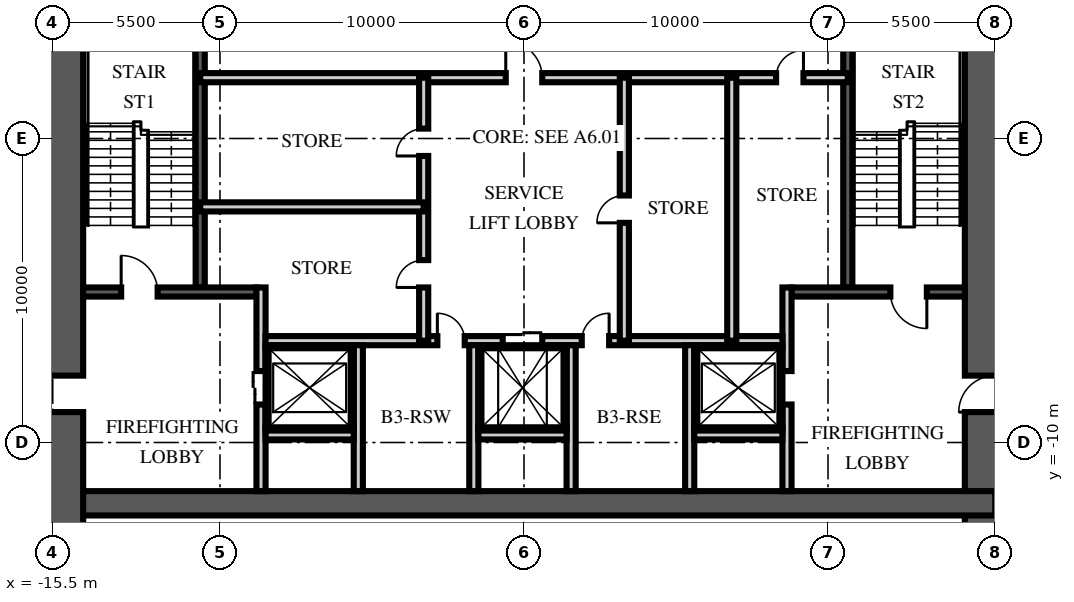
"""IFC4 building model, lengths in metres.
Left out: names, types, materials, properties, quantities, classifications, styles, units other than length and angle.
Written with IfcOpenShell. Run it as: python <this file> out.ifc"""

import sys

from ifc_helpers import new_model, si_unit, direction, frame, frame_2d, origin, place, context, subcontext, project, spatial, rectangle, extrude, element, fill, save


model = new_model("IFC4")
c1 = context("Model", 3, precision=1e-05, world=origin(), true_north=direction((0.0, 1.0)))
c2 = subcontext(c1, "Body", "Model", "MODEL_VIEW")
j1 = project(units=[si_unit("LENGTHUNIT", "METRE"), si_unit("PLANEANGLEUNIT", "RADIAN")], contexts=[c1])
p1 = place(None, origin())
s1 = spatial("IfcSite", under=j1, at=p1, CompositionType="ELEMENT")
p2 = place(p1, origin())
s2 = spatial("IfcBuilding", under=s1, at=p2, CompositionType="ELEMENT")
p3 = place(p2, frame((0.0, 0.0, -13.2)))
s3 = spatial("IfcBuildingStorey", under=s2, at=p3, CompositionType="ELEMENT", Elevation=-13.2)
p4 = place(p3, frame((15.5, -15.5, -0.4), z_axis=(0.0, 0.0, 1.0), x_axis=(0.0, 1.0, 0.0)))
e1 = element("IfcWall", 1, at=p4, inside=s3, PredefinedType="SHEAR", context=c2, shape_type="SweptSolid", body=[
    extrude(rectangle(XDim=31.0, YDim=2.0, at=frame_2d((15.5, 0.0))), origin(), (0.0, 0.0, 1.0), 4.3),
])
p5 = place(p4, frame((6.5, 0.0, 0.4)))
e2 = element("IfcOpeningElement", 2, at=p5, cuts=e1, PredefinedType="OPENING", context=c2, shape_type="SweptSolid", body=[
    extrude(rectangle(XDim=1.2, YDim=2.1, at=frame_2d((0.6, 1.05))), frame((0.0, 1.01, 0.0), z_axis=(0.0, -1.0, 0.0), x_axis=(1.0, 0.0, 0.0)), (0.0, 0.0, 1.0), 2.02),
])
p6 = place(p4, frame((23.0, 0.0, 0.4)))
e3 = element("IfcOpeningElement", 3, at=p6, cuts=e1, PredefinedType="OPENING", context=c2, shape_type="SweptSolid", body=[
    extrude(rectangle(XDim=1.8, YDim=2.1, at=frame_2d((0.9, 1.05))), frame((0.0, 1.01, 0.0), z_axis=(0.0, -1.0, 0.0), x_axis=(1.0, 0.0, 0.0)), (0.0, 0.0, 1.0), 2.02),
])
p7 = place(p3, frame((-15.5, -12.0, -0.4), z_axis=(0.0, 0.0, 1.0), x_axis=(1.0, 0.0, 0.0)))
e4 = element("IfcWall", 4, at=p7, inside=s3, PredefinedType="SHEAR", context=c2, shape_type="SweptSolid", body=[
    extrude(rectangle(XDim=31.0, YDim=0.8, at=frame_2d((15.5, 0.0))), origin(), (0.0, 0.0, 1.0), 4.3),
])
p8 = place(p3, frame((-15.5, -15.5, -0.4), z_axis=(0.0, 0.0, 1.0), x_axis=(0.0, 1.0, 0.0)))
e5 = element("IfcWall", 5, at=p8, inside=s3, PredefinedType="SHEAR", context=c2, shape_type="SweptSolid", body=[
    extrude(rectangle(XDim=31.0, YDim=2.0, at=frame_2d((15.5, 0.0))), origin(), (0.0, 0.0, 1.0), 4.3),
])
p9 = place(p8, frame((6.5, 0.0, 0.4)))
e6 = element("IfcOpeningElement", 6, at=p9, cuts=e5, PredefinedType="OPENING", context=c2, shape_type="SweptSolid", body=[
    extrude(rectangle(XDim=1.2, YDim=2.1, at=frame_2d((0.6, 1.05))), frame((0.0, 1.01, 0.0), z_axis=(0.0, -1.0, 0.0), x_axis=(1.0, 0.0, 0.0)), (0.0, 0.0, 1.0), 2.02),
])
p10 = place(p8, frame((23.0, 0.0, 0.4)))
e7 = element("IfcOpeningElement", 7, at=p10, cuts=e5, PredefinedType="OPENING", context=c2, shape_type="SweptSolid", body=[
    extrude(rectangle(XDim=1.8, YDim=2.1, at=frame_2d((0.9, 1.05))), frame((0.0, 1.01, 0.0), z_axis=(0.0, -1.0, 0.0), x_axis=(1.0, 0.0, 0.0)), (0.0, 0.0, 1.0), 2.02),
])
p11 = place(p3, frame((-10.65, -4.9, 0.0), z_axis=(0.0, 0.0, 1.0), x_axis=(0.0, 1.0, 0.0)))
e8 = element("IfcWall", 8, at=p11, inside=s3, PredefinedType="SOLIDWALL", context=c2, shape_type="SweptSolid", body=[
    extrude(rectangle(XDim=10.1, YDim=0.3, at=frame_2d((5.05, 0.0))), origin(), (0.0, 0.0, 1.0), 3.9),
])
p12 = place(p3, frame((-14.5, -5.05, 0.0), z_axis=(0.0, 0.0, 1.0), x_axis=(1.0, 0.0, 0.0)))
e9 = element("IfcWall", 9, at=p12, inside=s3, PredefinedType="SOLIDWALL", context=c2, shape_type="SweptSolid", body=[
    extrude(rectangle(XDim=5.7, YDim=0.3, at=frame_2d((2.85, 0.0))), origin(), (0.0, 0.0, 1.0), 3.9),
])
p13 = place(p12, frame((1.25, 0.0, 0.0)))
e10 = element("IfcOpeningElement", 10, at=p13, cuts=e9, PredefinedType="OPENING", context=c2, shape_type="SweptSolid", body=[
    extrude(rectangle(XDim=1.2, YDim=2.1, at=frame_2d((0.6, 1.05))), frame((0.0, 0.16, 0.0), z_axis=(0.0, -1.0, 0.0), x_axis=(1.0, 0.0, 0.0)), (0.0, 0.0, 1.0), 0.32),
])
p14 = place(p3, frame((-8.65, -11.6, 0.0), z_axis=(0.0, 0.0, 1.0), x_axis=(0.0, 1.0, 0.0)))
e11 = element("IfcWall", 11, at=p14, inside=s3, PredefinedType="PARTITIONING", context=c2, shape_type="SweptSolid", body=[
    extrude(rectangle(XDim=6.7, YDim=0.3, at=frame_2d((3.35, 0.0))), origin(), (0.0, 0.0, 1.0), 3.9),
])
p15 = place(p14, frame((2.85, 0.0, 0.0)))
e12 = element("IfcOpeningElement", 12, at=p15, cuts=e11, PredefinedType="OPENING", context=c2, shape_type="SweptSolid", body=[
    extrude(rectangle(XDim=1.1, YDim=2.1, at=frame_2d((0.55, 1.05))), frame((0.0, 0.16, 0.0), z_axis=(0.0, -1.0, 0.0), x_axis=(1.0, 0.0, 0.0)), (0.0, 0.0, 1.0), 0.32),
])
p16 = place(p3, frame((10.65, -4.9, 0.0), z_axis=(0.0, 0.0, 1.0), x_axis=(0.0, 1.0, 0.0)))
e13 = element("IfcWall", 13, at=p16, inside=s3, PredefinedType="SOLIDWALL", context=c2, shape_type="SweptSolid", body=[
    extrude(rectangle(XDim=10.1, YDim=0.3, at=frame_2d((5.05, 0.0))), origin(), (0.0, 0.0, 1.0), 3.9),
])
p17 = place(p3, frame((14.5, -5.05, 0.0), z_axis=(0.0, 0.0, 1.0), x_axis=(-1.0, 0.0, 0.0)))
e14 = element("IfcWall", 14, at=p17, inside=s3, PredefinedType="SOLIDWALL", context=c2, shape_type="SweptSolid", body=[
    extrude(rectangle(XDim=5.7, YDim=0.3, at=frame_2d((2.85, 0.0))), origin(), (0.0, 0.0, 1.0), 3.9),
])
p18 = place(p17, frame((1.25, 0.0, 0.0)))
e15 = element("IfcOpeningElement", 15, at=p18, cuts=e14, PredefinedType="OPENING", context=c2, shape_type="SweptSolid", body=[
    extrude(rectangle(XDim=1.2, YDim=2.1, at=frame_2d((0.6, 1.05))), frame((0.0, 0.16, 0.0), z_axis=(0.0, -1.0, 0.0), x_axis=(1.0, 0.0, 0.0)), (0.0, 0.0, 1.0), 0.32),
])
p19 = place(p3, frame((8.65, -11.6, 0.0), z_axis=(0.0, 0.0, 1.0), x_axis=(0.0, 1.0, 0.0)))
e16 = element("IfcWall", 16, at=p19, inside=s3, PredefinedType="PARTITIONING", context=c2, shape_type="SweptSolid", body=[
    extrude(rectangle(XDim=6.7, YDim=0.3, at=frame_2d((3.35, 0.0))), origin(), (0.0, 0.0, 1.0), 3.9),
])
p20 = place(p19, frame((2.85, 0.0, 0.0)))
e17 = element("IfcOpeningElement", 17, at=p20, cuts=e16, PredefinedType="OPENING", context=c2, shape_type="SweptSolid", body=[
    extrude(rectangle(XDim=1.1, YDim=2.1, at=frame_2d((0.55, 1.05))), frame((0.0, 0.16, 0.0), z_axis=(0.0, -1.0, 0.0), x_axis=(1.0, 0.0, 0.0)), (0.0, 0.0, 1.0), 0.32),
])
p21 = place(p3, frame((-8.5, -6.65, 0.0), z_axis=(0.0, 0.0, 1.0), x_axis=(1.0, 0.0, 0.0)))
e18 = element("IfcWall", 18, at=p21, inside=s3, PredefinedType="PARTITIONING", context=c2, shape_type="SweptSolid", body=[
    extrude(rectangle(XDim=17.0, YDim=0.3, at=frame_2d((8.5, 0.0))), origin(), (0.0, 0.0, 1.0), 3.9),
])
p22 = place(p21, frame((7.8, 0.0, 0.0)))
e19 = element("IfcOpeningElement", 19, at=p22, cuts=e18, PredefinedType="OPENING", context=c2, shape_type="SweptSolid", body=[
    extrude(rectangle(XDim=1.3, YDim=2.4, at=frame_2d((0.65, 1.2))), frame((0.0, 0.16, 0.0), z_axis=(0.0, -1.0, 0.0), x_axis=(1.0, 0.0, 0.0)), (0.0, 0.0, 1.0), 0.32),
])
p23 = place(p21, frame((5.65, 0.0, 0.0)))
e20 = element("IfcOpeningElement", 20, at=p23, cuts=e18, PredefinedType="OPENING", context=c2, shape_type="SweptSolid", body=[
    extrude(rectangle(XDim=0.9, YDim=2.1, at=frame_2d((0.45, 1.05))), frame((0.0, 0.16, 0.0), z_axis=(0.0, -1.0, 0.0), x_axis=(1.0, 0.0, 0.0)), (0.0, 0.0, 1.0), 0.32),
])
p24 = place(p21, frame((10.4, 0.0, 0.0)))
e21 = element("IfcOpeningElement", 21, at=p24, cuts=e18, PredefinedType="OPENING", context=c2, shape_type="SweptSolid", body=[
    extrude(rectangle(XDim=0.9, YDim=2.1, at=frame_2d((0.45, 1.05))), frame((0.0, 0.16, 0.0), z_axis=(0.0, -1.0, 0.0), x_axis=(1.0, 0.0, 0.0)), (0.0, 0.0, 1.0), 0.32),
])
for number, where, z_axis, x_axis in (
    (22, (-5.45, -11.6, 0.0), (0.0, 0.0, 1.0), (0.0, 1.0, 0.0)),
    (23, (-1.65, -11.6, 0.0), (0.0, 0.0, 1.0), (0.0, 1.0, 0.0)),
    (24, (1.55, -11.6, 0.0), (0.0, 0.0, 1.0), (0.0, 1.0, 0.0)),
    (25, (5.45, -11.6, 0.0), (0.0, 0.0, 1.0), (0.0, 1.0, 0.0)),
):
    element("IfcWall", number, at=place(p3, frame(where, z_axis=z_axis, x_axis=x_axis)), inside=s3, PredefinedType="PARTITIONING", context=c2, shape_type="SweptSolid", body=[
        extrude(rectangle(XDim=4.8, YDim=0.3, at=frame_2d((2.4, 0.0))), origin(), (0.0, 0.0, 1.0), 3.9),
    ])
for number, where, z_axis, x_axis in (
    (26, (-8.5, -9.75, 0.0), (0.0, 0.0, 1.0), (1.0, 0.0, 0.0)),
    (27, (-1.5, -9.75, 0.0), (0.0, 0.0, 1.0), (1.0, 0.0, 0.0)),
    (28, (5.6, -9.75, 0.0), (0.0, 0.0, 1.0), (1.0, 0.0, 0.0)),
):
    element("IfcWall", number, at=place(p3, frame(where, z_axis=z_axis, x_axis=x_axis)), inside=s3, PredefinedType="PARTITIONING", context=c2, shape_type="SweptSolid", body=[
        extrude(rectangle(XDim=2.9, YDim=0.3, at=frame_2d((1.45, 0.0))), origin(), (0.0, 0.0, 1.0), 3.9),
    ])
p25 = place(p3, frame((-10.65, 2.0, 0.0), z_axis=(0.0, 0.0, 1.0), x_axis=(1.0, 0.0, 0.0)))
e29 = element("IfcWall", 29, at=p25, inside=s3, PredefinedType="PARTITIONING", context=c2, shape_type="SweptSolid", body=[
    extrude(rectangle(XDim=21.3, YDim=0.3, at=frame_2d((10.65, 0.0))), origin(), (0.0, 0.0, 1.0), 3.9),
])
p26 = place(p25, frame((10.05, 0.0, 0.0)))
e30 = element("IfcOpeningElement", 30, at=p26, cuts=e29, PredefinedType="OPENING", context=c2, shape_type="SweptSolid", body=[
    extrude(rectangle(XDim=1.2, YDim=2.1, at=frame_2d((0.6, 1.05))), frame((0.0, 0.16, 0.0), z_axis=(0.0, -1.0, 0.0), x_axis=(1.0, 0.0, 0.0)), (0.0, 0.0, 1.0), 0.32),
])
p27 = place(p25, frame((18.942, 0.0, 0.0)))
e31 = element("IfcOpeningElement", 31, at=p27, cuts=e29, PredefinedType="OPENING", context=c2, shape_type="SweptSolid", body=[
    extrude(rectangle(XDim=0.9, YDim=2.1, at=frame_2d((0.45, 1.05))), frame((0.0, 0.16, 0.0), z_axis=(0.0, -1.0, 0.0), x_axis=(1.0, 0.0, 0.0)), (0.0, 0.0, 1.0), 0.32),
])
p28 = place(p3, frame((-3.3, -6.65, 0.0), z_axis=(0.0, 0.0, 1.0), x_axis=(0.0, 1.0, 0.0)))
e32 = element("IfcWall", 32, at=p28, inside=s3, PredefinedType="PARTITIONING", context=c2, shape_type="SweptSolid", body=[
    extrude(rectangle(XDim=8.65, YDim=0.3, at=frame_2d((4.325, 0.0))), origin(), (0.0, 0.0, 1.0), 3.9),
])
p29 = place(p28, frame((1.75, 0.0, 0.0)))
e33 = element("IfcOpeningElement", 33, at=p29, cuts=e32, PredefinedType="OPENING", context=c2, shape_type="SweptSolid", body=[
    extrude(rectangle(XDim=0.9, YDim=2.1, at=frame_2d((0.45, 1.05))), frame((0.0, 0.16, 0.0), z_axis=(0.0, -1.0, 0.0), x_axis=(1.0, 0.0, 0.0)), (0.0, 0.0, 1.0), 0.32),
])
p30 = place(p28, frame((6.075, 0.0, 0.0)))
e34 = element("IfcOpeningElement", 34, at=p30, cuts=e32, PredefinedType="OPENING", context=c2, shape_type="SweptSolid", body=[
    extrude(rectangle(XDim=0.9, YDim=2.1, at=frame_2d((0.45, 1.05))), frame((0.0, 0.16, 0.0), z_axis=(0.0, -1.0, 0.0), x_axis=(1.0, 0.0, 0.0)), (0.0, 0.0, 1.0), 0.32),
])
p31 = place(p3, frame((3.3, -6.65, 0.0), z_axis=(0.0, 0.0, 1.0), x_axis=(0.0, 1.0, 0.0)))
e35 = element("IfcWall", 35, at=p31, inside=s3, PredefinedType="PARTITIONING", context=c2, shape_type="SweptSolid", body=[
    extrude(rectangle(XDim=8.65, YDim=0.3, at=frame_2d((4.325, 0.0))), origin(), (0.0, 0.0, 1.0), 3.9),
])
p32 = place(p31, frame((3.875, 0.0, 0.0)))
e36 = element("IfcOpeningElement", 36, at=p32, cuts=e35, PredefinedType="OPENING", context=c2, shape_type="SweptSolid", body=[
    extrude(rectangle(XDim=0.9, YDim=2.1, at=frame_2d((0.45, 1.05))), frame((0.0, 0.16, 0.0), z_axis=(0.0, -1.0, 0.0), x_axis=(1.0, 0.0, 0.0)), (0.0, 0.0, 1.0), 0.32),
])
p33 = place(p3, frame((-10.65, -2.25, 0.0), z_axis=(0.0, 0.0, 1.0), x_axis=(1.0, 0.0, 0.0)))
e37 = element("IfcWall", 37, at=p33, inside=s3, PredefinedType="PARTITIONING", context=c2, shape_type="SweptSolid", body=[
    extrude(rectangle(XDim=7.35, YDim=0.3, at=frame_2d((3.675, 0.0))), origin(), (0.0, 0.0, 1.0), 3.9),
])
p34 = place(p3, frame((6.834, -6.65, 0.0), z_axis=(0.0, 0.0, 1.0), x_axis=(0.0, 1.0, 0.0)))
e38 = element("IfcWall", 38, at=p34, inside=s3, PredefinedType="PARTITIONING", context=c2, shape_type="SweptSolid", body=[
    extrude(rectangle(XDim=8.65, YDim=0.3, at=frame_2d((4.325, 0.0))), origin(), (0.0, 0.0, 1.0), 3.9),
])
for number, where, z_axis, x_axis in (
    (39, (-8.5, -9.55, -1.8), (0.0, 0.0, 1.0), (1.0, 0.0, 0.0)),
    (40, (-5.6, -6.85, -1.8), (0.0, 0.0, 1.0), (-1.0, 0.0, 0.0)),
):
    element("IfcWall", number, at=place(p3, frame(where, z_axis=z_axis, x_axis=x_axis)), inside=s3, PredefinedType="SOLIDWALL", context=c2, shape_type="SweptSolid", body=[
        extrude(rectangle(XDim=2.9, YDim=0.1, at=frame_2d((1.45, 0.0))), origin(), (0.0, 0.0, 1.0), 1.8),
    ])
for number, where, z_axis, x_axis in (
    (41, (-8.45, -6.9, -1.8), (0.0, 0.0, 1.0), (0.0, -1.0, 0.0)),
    (42, (-5.65, -9.5, -1.8), (0.0, 0.0, 1.0), (0.0, 1.0, 0.0)),
):
    element("IfcWall", number, at=place(p3, frame(where, z_axis=z_axis, x_axis=x_axis)), inside=s3, PredefinedType="SOLIDWALL", context=c2, shape_type="SweptSolid", body=[
        extrude(rectangle(XDim=2.6, YDim=0.1, at=frame_2d((1.3, 0.0))), origin(), (0.0, 0.0, 1.0), 1.8),
    ])
for number, where, z_axis, x_axis in (
    (43, (5.6, -9.55, -1.8), (0.0, 0.0, 1.0), (1.0, 0.0, 0.0)),
    (44, (8.5, -6.85, -1.8), (0.0, 0.0, 1.0), (-1.0, 0.0, 0.0)),
):
    element("IfcWall", number, at=place(p3, frame(where, z_axis=z_axis, x_axis=x_axis)), inside=s3, PredefinedType="SOLIDWALL", context=c2, shape_type="SweptSolid", body=[
        extrude(rectangle(XDim=2.9, YDim=0.1, at=frame_2d((1.45, 0.0))), origin(), (0.0, 0.0, 1.0), 1.8),
    ])
for number, where, z_axis, x_axis in (
    (45, (5.65, -6.9, -1.8), (0.0, 0.0, 1.0), (0.0, -1.0, 0.0)),
    (46, (8.45, -9.5, -1.8), (0.0, 0.0, 1.0), (0.0, 1.0, 0.0)),
):
    element("IfcWall", number, at=place(p3, frame(where, z_axis=z_axis, x_axis=x_axis)), inside=s3, PredefinedType="SOLIDWALL", context=c2, shape_type="SweptSolid", body=[
        extrude(rectangle(XDim=2.6, YDim=0.1, at=frame_2d((1.3, 0.0))), origin(), (0.0, 0.0, 1.0), 1.8),
    ])
for number, where, z_axis, x_axis in (
    (47, (-1.5, -9.55, -1.8), (0.0, 0.0, 1.0), (1.0, 0.0, 0.0)),
    (48, (1.4, -6.85, -1.8), (0.0, 0.0, 1.0), (-1.0, 0.0, 0.0)),
):
    element("IfcWall", number, at=place(p3, frame(where, z_axis=z_axis, x_axis=x_axis)), inside=s3, PredefinedType="SOLIDWALL", context=c2, shape_type="SweptSolid", body=[
        extrude(rectangle(XDim=2.9, YDim=0.1, at=frame_2d((1.45, 0.0))), origin(), (0.0, 0.0, 1.0), 1.8),
    ])
for number, where, z_axis, x_axis in (
    (49, (-1.45, -6.9, -1.8), (0.0, 0.0, 1.0), (0.0, -1.0, 0.0)),
    (50, (1.35, -9.5, -1.8), (0.0, 0.0, 1.0), (0.0, 1.0, 0.0)),
):
    element("IfcWall", number, at=place(p3, frame(where, z_axis=z_axis, x_axis=x_axis)), inside=s3, PredefinedType="SOLIDWALL", context=c2, shape_type="SweptSolid", body=[
        extrude(rectangle(XDim=2.6, YDim=0.1, at=frame_2d((1.3, 0.0))), origin(), (0.0, 0.0, 1.0), 1.8),
    ])
p35 = place(p13, origin())
e51 = element("IfcDoor", 51, at=p35, inside=s3, OperationType="SINGLE_SWING_LEFT", PredefinedType="DOOR", context=c2, shape_type="SweptSolid", body=[
    extrude(rectangle(XDim=1.2, YDim=2.1, at=frame_2d((0.6, 1.05))), frame((0.0, 0.025, 0.0), z_axis=(0.0, -1.0, 0.0), x_axis=(1.0, 0.0, 0.0)), (0.0, 0.0, 1.0), 0.05),
])
fill(e10, e51)
p36 = place(p9, origin())
e52 = element("IfcDoor", 52, at=p36, inside=s3, OperationType="SINGLE_SWING_LEFT", PredefinedType="DOOR", context=c2, shape_type="SweptSolid", body=[
    extrude(rectangle(XDim=1.2, YDim=2.1, at=frame_2d((0.6, 1.05))), frame((0.0, 0.025, 0.0), z_axis=(0.0, -1.0, 0.0), x_axis=(1.0, 0.0, 0.0)), (0.0, 0.0, 1.0), 0.05),
])
fill(e6, e52)
p37 = place(p18, origin())
e53 = element("IfcDoor", 53, at=p37, inside=s3, OperationType="SINGLE_SWING_LEFT", PredefinedType="DOOR", context=c2, shape_type="SweptSolid", body=[
    extrude(rectangle(XDim=1.2, YDim=2.1, at=frame_2d((0.6, 1.05))), frame((0.0, 0.025, 0.0), z_axis=(0.0, -1.0, 0.0), x_axis=(1.0, 0.0, 0.0)), (0.0, 0.0, 1.0), 0.05),
])
fill(e15, e53)
p38 = place(p5, origin())
e54 = element("IfcDoor", 54, at=p38, inside=s3, OperationType="SINGLE_SWING_LEFT", PredefinedType="DOOR", context=c2, shape_type="SweptSolid", body=[
    extrude(rectangle(XDim=1.2, YDim=2.1, at=frame_2d((0.6, 1.05))), frame((0.0, 0.025, 0.0), z_axis=(0.0, -1.0, 0.0), x_axis=(1.0, 0.0, 0.0)), (0.0, 0.0, 1.0), 0.05),
])
fill(e2, e54)
p39 = place(p15, origin())
e55 = element("IfcDoor", 55, at=p39, inside=s3, OperationType="DOUBLE_DOOR_SLIDING", PredefinedType="DOOR", context=c2, shape_type="SweptSolid", body=[
    extrude(rectangle(XDim=1.1, YDim=2.1, at=frame_2d((0.55, 1.05))), frame((0.0, 0.025, 0.0), z_axis=(0.0, -1.0, 0.0), x_axis=(1.0, 0.0, 0.0)), (0.0, 0.0, 1.0), 0.05),
])
fill(e12, e55)
p40 = place(p20, origin())
e56 = element("IfcDoor", 56, at=p40, inside=s3, OperationType="DOUBLE_DOOR_SLIDING", PredefinedType="DOOR", context=c2, shape_type="SweptSolid", body=[
    extrude(rectangle(XDim=1.1, YDim=2.1, at=frame_2d((0.55, 1.05))), frame((0.0, 0.025, 0.0), z_axis=(0.0, -1.0, 0.0), x_axis=(1.0, 0.0, 0.0)), (0.0, 0.0, 1.0), 0.05),
])
fill(e17, e56)
p41 = place(p22, origin())
e57 = element("IfcDoor", 57, at=p41, inside=s3, OperationType="DOUBLE_DOOR_SLIDING", PredefinedType="DOOR", context=c2, shape_type="SweptSolid", body=[
    extrude(rectangle(XDim=1.3, YDim=2.4, at=frame_2d((0.65, 1.2))), frame((0.0, 0.025, 0.0), z_axis=(0.0, -1.0, 0.0), x_axis=(1.0, 0.0, 0.0)), (0.0, 0.0, 1.0), 0.05),
])
fill(e19, e57)
p42 = place(p26, origin())
e58 = element("IfcDoor", 58, at=p42, inside=s3, OperationType="SINGLE_SWING_LEFT", PredefinedType="DOOR", context=c2, shape_type="SweptSolid", body=[
    extrude(rectangle(XDim=1.2, YDim=2.1, at=frame_2d((0.6, 1.05))), frame((0.0, 0.025, 0.0), z_axis=(0.0, -1.0, 0.0), x_axis=(1.0, 0.0, 0.0)), (0.0, 0.0, 1.0), 0.05),
])
fill(e30, e58)
p43 = place(p23, origin())
e59 = element("IfcDoor", 59, at=p43, inside=s3, OperationType="SINGLE_SWING_LEFT", PredefinedType="DOOR", context=c2, shape_type="SweptSolid", body=[
    extrude(rectangle(XDim=0.9, YDim=2.1, at=frame_2d((0.45, 1.05))), frame((0.0, 0.025, 0.0), z_axis=(0.0, -1.0, 0.0), x_axis=(1.0, 0.0, 0.0)), (0.0, 0.0, 1.0), 0.05),
])
fill(e20, e59)
p44 = place(p24, origin())
e60 = element("IfcDoor", 60, at=p44, inside=s3, OperationType="SINGLE_SWING_RIGHT", PredefinedType="DOOR", context=c2, shape_type="SweptSolid", body=[
    extrude(rectangle(XDim=0.9, YDim=2.1, at=frame_2d((0.45, 1.05))), frame((0.0, 0.025, 0.0), z_axis=(0.0, -1.0, 0.0), x_axis=(1.0, 0.0, 0.0)), (0.0, 0.0, 1.0), 0.05),
])
fill(e21, e60)
p45 = place(p29, origin())
e61 = element("IfcDoor", 61, at=p45, inside=s3, OperationType="SINGLE_SWING_LEFT", PredefinedType="DOOR", context=c2, shape_type="SweptSolid", body=[
    extrude(rectangle(XDim=0.9, YDim=2.1, at=frame_2d((0.45, 1.05))), frame((0.0, 0.025, 0.0), z_axis=(0.0, -1.0, 0.0), x_axis=(1.0, 0.0, 0.0)), (0.0, 0.0, 1.0), 0.05),
])
fill(e33, e61)
p46 = place(p30, origin())
e62 = element("IfcDoor", 62, at=p46, inside=s3, OperationType="SINGLE_SWING_LEFT", PredefinedType="DOOR", context=c2, shape_type="SweptSolid", body=[
    extrude(rectangle(XDim=0.9, YDim=2.1, at=frame_2d((0.45, 1.05))), frame((0.0, 0.025, 0.0), z_axis=(0.0, -1.0, 0.0), x_axis=(1.0, 0.0, 0.0)), (0.0, 0.0, 1.0), 0.05),
])
fill(e34, e62)
p47 = place(p32, origin())
e63 = element("IfcDoor", 63, at=p47, inside=s3, OperationType="SINGLE_SWING_LEFT", PredefinedType="DOOR", context=c2, shape_type="SweptSolid", body=[
    extrude(rectangle(XDim=0.9, YDim=2.1, at=frame_2d((0.45, 1.05))), frame((0.0, 0.025, 0.0), z_axis=(0.0, -1.0, 0.0), x_axis=(1.0, 0.0, 0.0)), (0.0, 0.0, 1.0), 0.05),
])
fill(e36, e63)
p48 = place(p27, origin())
e64 = element("IfcDoor", 64, at=p48, inside=s3, OperationType="SINGLE_SWING_RIGHT", PredefinedType="DOOR", context=c2, shape_type="SweptSolid", body=[
    extrude(rectangle(XDim=0.9, YDim=2.1, at=frame_2d((0.45, 1.05))), frame((0.0, 0.025, 0.0), z_axis=(0.0, -1.0, 0.0), x_axis=(1.0, 0.0, 0.0)), (0.0, 0.0, 1.0), 0.05),
])
fill(e31, e64)
save(model, sys.argv[1])
